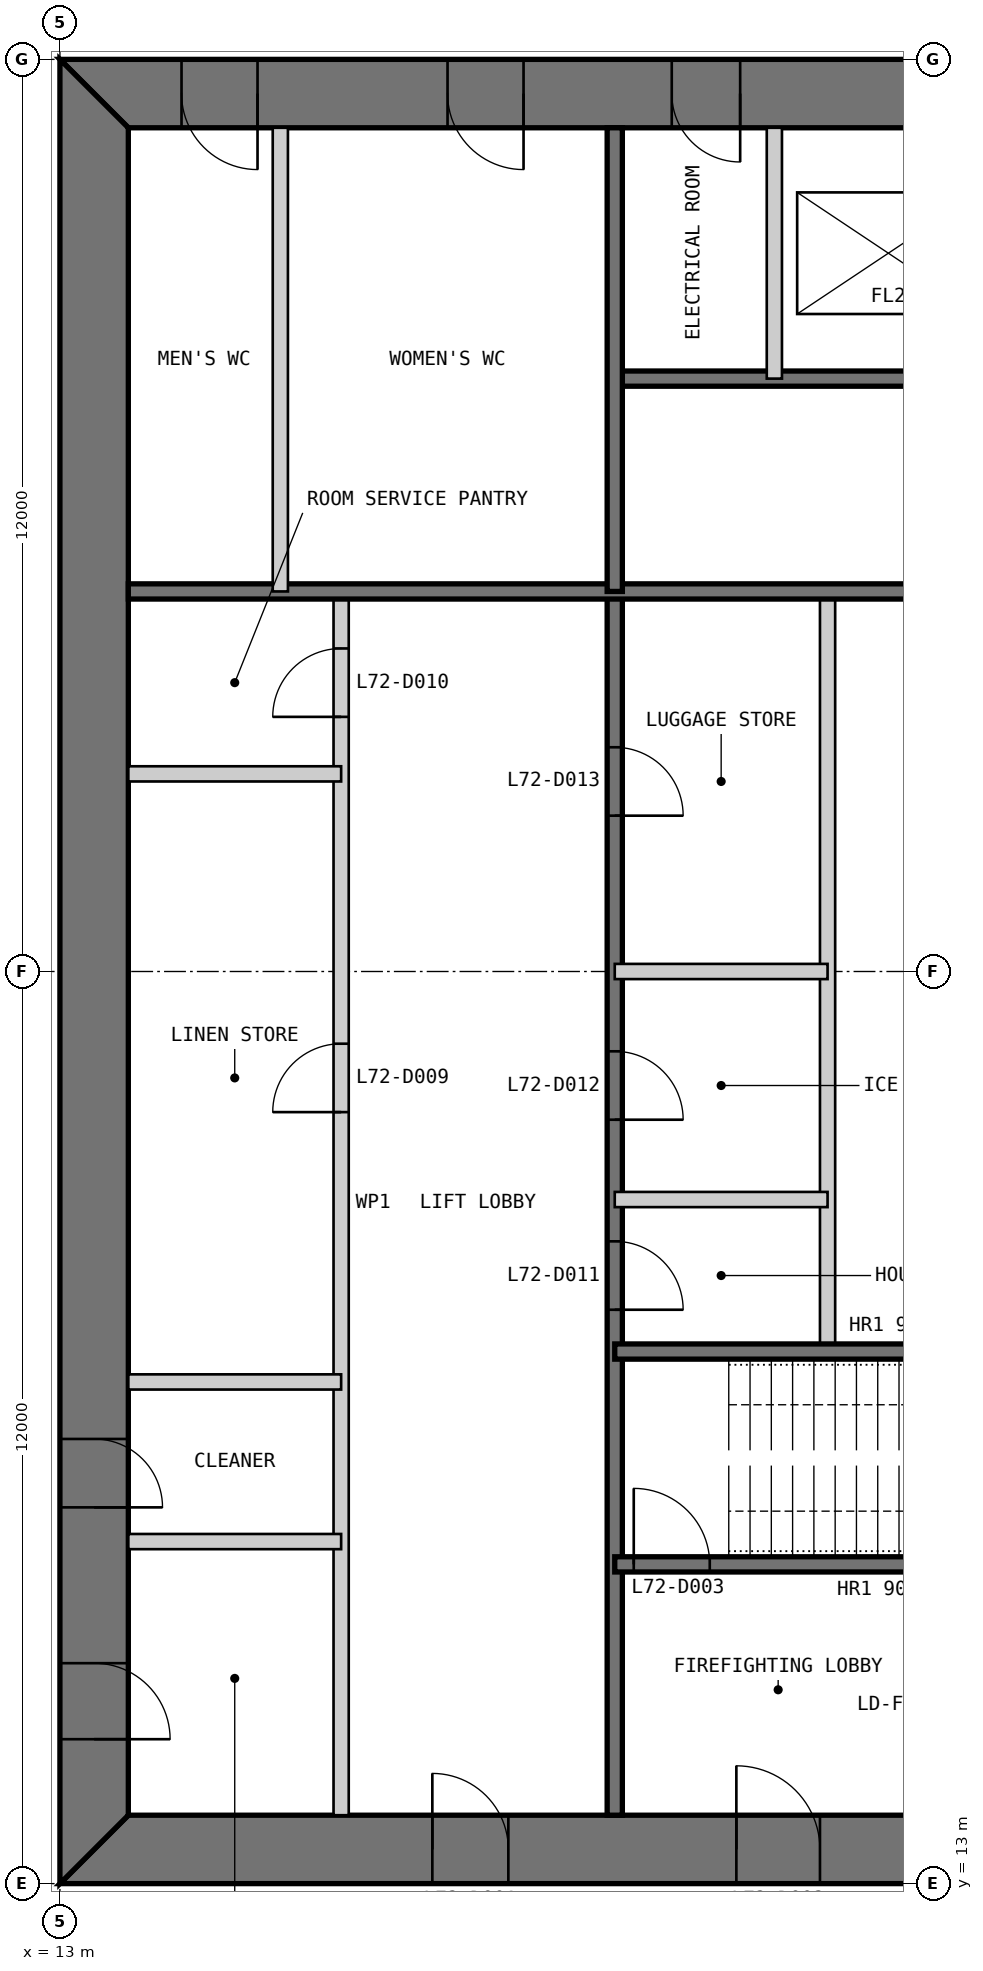
"""IFC4 building model, lengths in metres.
Left out: names, types, materials, properties, quantities, classifications, styles, units other than length and angle.
Written with IfcOpenShell. Run it as: python <this file> out.ifc"""

import sys

from ifc_helpers import new_model, si_unit, direction, frame, frame_2d, origin, place, context, subcontext, project, spatial, polyline, rectangle, outline, extrude, element, fill, save


model = new_model("IFC4")
c1 = context("Model", 3, precision=1e-05, world=origin(), true_north=direction((0.0, 1.0)))
c2 = subcontext(c1, "Body", "Model", "MODEL_VIEW")
j1 = project(units=[si_unit("LENGTHUNIT", "METRE"), si_unit("PLANEANGLEUNIT", "RADIAN")], contexts=[c1])
p1 = place(None, origin())
s1 = spatial("IfcSite", under=j1, at=p1, CompositionType="ELEMENT")
p2 = place(p1, origin())
s2 = spatial("IfcBuilding", under=s1, at=p2, CompositionType="ELEMENT")
p3 = place(p2, frame((0.0, 0.0, 296.8)))
s3 = spatial("IfcBuildingStorey", under=s2, at=p3, CompositionType="ELEMENT", Elevation=296.8)
p4 = place(p3, frame((13.0, 13.45, 0.0), z_axis=(0.0, 0.0, 1.0), x_axis=(1.0, 0.0, 0.0)))
e1 = element("IfcWall", 1, at=p4, inside=s3, PredefinedType="SHEAR", context=c2, shape_type="SweptSolid", body=[
    extrude(outline(polyline([(0.0, -0.45), (24.0, -0.45), (23.1, 0.45), (0.9, 0.45), (0.0, -0.45)])), origin(), (0.0, 0.0, 1.0), 5.0),
])
p5 = place(p4, frame((4.9, 0.0, 0.0)))
e2 = element("IfcOpeningElement", 2, at=p5, cuts=e1, PredefinedType="OPENING", context=c2, shape_type="SweptSolid", body=[
    extrude(rectangle(XDim=1.0, YDim=2.2, at=frame_2d((0.5, 1.1))), frame((0.0, 0.46, 0.0), z_axis=(0.0, -1.0, 0.0), x_axis=(1.0, 0.0, 0.0)), (0.0, 0.0, 1.0), 0.92),
])
p6 = place(p4, frame((8.9, 0.0, 0.0)))
e3 = element("IfcOpeningElement", 3, at=p6, cuts=e1, PredefinedType="OPENING", context=c2, shape_type="SweptSolid", body=[
    extrude(rectangle(XDim=1.1, YDim=2.2, at=frame_2d((0.55, 1.1))), frame((0.0, 0.46, 0.0), z_axis=(0.0, -1.0, 0.0), x_axis=(1.0, 0.0, 0.0)), (0.0, 0.0, 1.0), 0.92),
])
p7 = place(p4, frame((15.05, 0.0, 0.0)))
e4 = element("IfcOpeningElement", 4, at=p7, cuts=e1, PredefinedType="OPENING", context=c2, shape_type="SweptSolid", body=[
    extrude(rectangle(XDim=0.9, YDim=2.2, at=frame_2d((0.45, 1.1))), frame((0.0, 0.46, 0.0), z_axis=(0.0, -1.0, 0.0), x_axis=(1.0, 0.0, 0.0)), (0.0, 0.0, 1.0), 0.92),
])
p8 = place(p4, frame((17.9, 0.0, 0.0)))
e5 = element("IfcOpeningElement", 5, at=p8, cuts=e1, PredefinedType="OPENING", context=c2, shape_type="SweptSolid", body=[
    extrude(rectangle(XDim=1.0, YDim=2.2, at=frame_2d((0.5, 1.1))), frame((0.0, 0.46, 0.0), z_axis=(0.0, -1.0, 0.0), x_axis=(1.0, 0.0, 0.0)), (0.0, 0.0, 1.0), 0.92),
])
p9 = place(p4, frame((21.4, 0.0, 0.0)))
e6 = element("IfcOpeningElement", 6, at=p9, cuts=e1, PredefinedType="OPENING", context=c2, shape_type="SweptSolid", body=[
    extrude(rectangle(XDim=1.0, YDim=2.2, at=frame_2d((0.5, 1.1))), frame((0.0, 0.46, 0.0), z_axis=(0.0, -1.0, 0.0), x_axis=(1.0, 0.0, 0.0)), (0.0, 0.0, 1.0), 0.92),
])
p10 = place(p3, frame((37.0, 36.55, 0.0), z_axis=(0.0, 0.0, 1.0), x_axis=(-1.0, 0.0, 0.0)))
e7 = element("IfcWall", 7, at=p10, inside=s3, PredefinedType="SHEAR", context=c2, shape_type="SweptSolid", body=[
    extrude(outline(polyline([(0.0, -0.45), (24.0, -0.45), (23.1, 0.45), (0.9, 0.45), (0.0, -0.45)])), origin(), (0.0, 0.0, 1.0), 5.0),
])
p11 = place(p10, frame((4.9, 0.0, 0.0)))
e8 = element("IfcOpeningElement", 8, at=p11, cuts=e7, PredefinedType="OPENING", context=c2, shape_type="SweptSolid", body=[
    extrude(rectangle(XDim=1.0, YDim=2.2, at=frame_2d((0.5, 1.1))), frame((0.0, 0.46, 0.0), z_axis=(0.0, -1.0, 0.0), x_axis=(1.0, 0.0, 0.0)), (0.0, 0.0, 1.0), 0.92),
])
p12 = place(p10, frame((8.9, 0.0, 0.0)))
e9 = element("IfcOpeningElement", 9, at=p12, cuts=e7, PredefinedType="OPENING", context=c2, shape_type="SweptSolid", body=[
    extrude(rectangle(XDim=1.1, YDim=2.2, at=frame_2d((0.55, 1.1))), frame((0.0, 0.46, 0.0), z_axis=(0.0, -1.0, 0.0), x_axis=(1.0, 0.0, 0.0)), (0.0, 0.0, 1.0), 0.92),
])
p13 = place(p10, frame((15.05, 0.0, 0.0)))
e10 = element("IfcOpeningElement", 10, at=p13, cuts=e7, PredefinedType="OPENING", context=c2, shape_type="SweptSolid", body=[
    extrude(rectangle(XDim=0.9, YDim=2.2, at=frame_2d((0.45, 1.1))), frame((0.0, 0.46, 0.0), z_axis=(0.0, -1.0, 0.0), x_axis=(1.0, 0.0, 0.0)), (0.0, 0.0, 1.0), 0.92),
])
p14 = place(p10, frame((17.9, 0.0, 0.0)))
e11 = element("IfcOpeningElement", 11, at=p14, cuts=e7, PredefinedType="OPENING", context=c2, shape_type="SweptSolid", body=[
    extrude(rectangle(XDim=1.0, YDim=2.2, at=frame_2d((0.5, 1.1))), frame((0.0, 0.46, 0.0), z_axis=(0.0, -1.0, 0.0), x_axis=(1.0, 0.0, 0.0)), (0.0, 0.0, 1.0), 0.92),
])
p15 = place(p10, frame((21.4, 0.0, 0.0)))
e12 = element("IfcOpeningElement", 12, at=p15, cuts=e7, PredefinedType="OPENING", context=c2, shape_type="SweptSolid", body=[
    extrude(rectangle(XDim=1.0, YDim=2.2, at=frame_2d((0.5, 1.1))), frame((0.0, 0.46, 0.0), z_axis=(0.0, -1.0, 0.0), x_axis=(1.0, 0.0, 0.0)), (0.0, 0.0, 1.0), 0.92),
])
p16 = place(p3, frame((13.45, 36.1, 0.0), z_axis=(0.0, 0.0, 1.0), x_axis=(0.0, -1.0, 0.0)))
e13 = element("IfcWall", 13, at=p16, inside=s3, PredefinedType="SHEAR", context=c2, shape_type="SweptSolid", body=[
    extrude(outline(polyline([(-0.9, -0.45), (23.1, -0.45), (22.2, 0.45), (0.0, 0.45), (-0.9, -0.45)])), origin(), (0.0, 0.0, 1.0), 5.0),
])
p17 = place(p16, frame((20.2, 0.0, 0.0)))
e14 = element("IfcOpeningElement", 14, at=p17, cuts=e13, PredefinedType="OPENING", context=c2, shape_type="SweptSolid", body=[
    extrude(rectangle(XDim=1.0, YDim=2.2, at=frame_2d((0.5, 1.1))), frame((0.0, 0.46, 0.0), z_axis=(0.0, -1.0, 0.0), x_axis=(1.0, 0.0, 0.0)), (0.0, 0.0, 1.0), 0.92),
])
p18 = place(p16, frame((17.25, 0.0, 0.0)))
e15 = element("IfcOpeningElement", 15, at=p18, cuts=e13, PredefinedType="OPENING", context=c2, shape_type="SweptSolid", body=[
    extrude(rectangle(XDim=0.9, YDim=2.2, at=frame_2d((0.45, 1.1))), frame((0.0, 0.46, 0.0), z_axis=(0.0, -1.0, 0.0), x_axis=(1.0, 0.0, 0.0)), (0.0, 0.0, 1.0), 0.92),
])
p19 = place(p3, frame((16.7, 13.9, 0.0), z_axis=(0.0, 0.0, 1.0), x_axis=(0.0, 1.0, 0.0)))
e16 = element("IfcWall", 16, at=p19, inside=s3, PredefinedType="PARTITIONING", context=c2, shape_type="SweptSolid", body=[
    extrude(rectangle(XDim=16.1, YDim=0.2, at=frame_2d((8.05, 0.0))), origin(), (0.0, 0.0, 1.0), 4.8),
])
p20 = place(p19, frame((9.25, 0.0, 0.0)))
e17 = element("IfcOpeningElement", 17, at=p20, cuts=e16, PredefinedType="OPENING", context=c2, shape_type="SweptSolid", body=[
    extrude(rectangle(XDim=0.9, YDim=2.2, at=frame_2d((0.45, 1.1))), frame((0.0, 0.11, 0.0), z_axis=(0.0, -1.0, 0.0), x_axis=(1.0, 0.0, 0.0)), (0.0, 0.0, 1.0), 0.22),
])
p21 = place(p19, frame((14.45, 0.0, 0.0)))
e18 = element("IfcOpeningElement", 18, at=p21, cuts=e16, PredefinedType="OPENING", context=c2, shape_type="SweptSolid", body=[
    extrude(rectangle(XDim=0.9, YDim=2.2, at=frame_2d((0.45, 1.1))), frame((0.0, 0.11, 0.0), z_axis=(0.0, -1.0, 0.0), x_axis=(1.0, 0.0, 0.0)), (0.0, 0.0, 1.0), 0.22),
])
p22 = place(p3, frame((20.3, 13.9, 0.0), z_axis=(0.0, 0.0, 1.0), x_axis=(0.0, 1.0, 0.0)))
e19 = element("IfcWall", 19, at=p22, inside=s3, PredefinedType="SOLIDWALL", context=c2, shape_type="SweptSolid", body=[
    extrude(rectangle(XDim=16.1, YDim=0.2, at=frame_2d((8.05, 0.0))), origin(), (0.0, 0.0, 1.0), 4.8),
])
p23 = place(p22, frame((6.65, 0.0, 0.0)))
e20 = element("IfcOpeningElement", 20, at=p23, cuts=e19, PredefinedType="OPENING", context=c2, shape_type="SweptSolid", body=[
    extrude(rectangle(XDim=0.9, YDim=2.2, at=frame_2d((0.45, 1.1))), frame((0.0, 0.11, 0.0), z_axis=(0.0, -1.0, 0.0), x_axis=(1.0, 0.0, 0.0)), (0.0, 0.0, 1.0), 0.22),
])
p24 = place(p22, frame((9.15, 0.0, 0.0)))
e21 = element("IfcOpeningElement", 21, at=p24, cuts=e19, PredefinedType="OPENING", context=c2, shape_type="SweptSolid", body=[
    extrude(rectangle(XDim=0.9, YDim=2.2, at=frame_2d((0.45, 1.1))), frame((0.0, 0.11, 0.0), z_axis=(0.0, -1.0, 0.0), x_axis=(1.0, 0.0, 0.0)), (0.0, 0.0, 1.0), 0.22),
])
p25 = place(p22, frame((13.15, 0.0, 0.0)))
e22 = element("IfcOpeningElement", 22, at=p25, cuts=e19, PredefinedType="OPENING", context=c2, shape_type="SweptSolid", body=[
    extrude(rectangle(XDim=0.9, YDim=2.2, at=frame_2d((0.45, 1.1))), frame((0.0, 0.11, 0.0), z_axis=(0.0, -1.0, 0.0), x_axis=(1.0, 0.0, 0.0)), (0.0, 0.0, 1.0), 0.22),
])
p26 = place(p3, frame((23.1, 20.0, 0.0), z_axis=(0.0, 0.0, 1.0), x_axis=(0.0, 1.0, 0.0)))
e23 = element("IfcWall", 23, at=p26, inside=s3, PredefinedType="PARTITIONING", context=c2, shape_type="SweptSolid", body=[
    extrude(rectangle(XDim=10.0, YDim=0.2, at=frame_2d((5.0, 0.0))), origin(), (0.0, 0.0, 1.0), 4.8),
])
p27 = place(p3, frame((20.3, 17.2, 0.0), z_axis=(0.0, 0.0, 1.0), x_axis=(1.0, 0.0, 0.0)))
e24 = element("IfcWall", 24, at=p27, inside=s3, PredefinedType="SOLIDWALL", context=c2, shape_type="SweptSolid", body=[
    extrude(rectangle(XDim=9.4, YDim=0.2, at=frame_2d((4.7, 0.0))), origin(), (0.0, 0.0, 1.0), 4.8),
])
p28 = place(p27, frame((0.25, 0.0, 0.0)))
e25 = element("IfcOpeningElement", 25, at=p28, cuts=e24, PredefinedType="OPENING", context=c2, shape_type="SweptSolid", body=[
    extrude(rectangle(XDim=1.0, YDim=2.2, at=frame_2d((0.5, 1.1))), frame((0.0, 0.11, 0.0), z_axis=(0.0, -1.0, 0.0), x_axis=(1.0, 0.0, 0.0)), (0.0, 0.0, 1.0), 0.22),
])
p29 = place(p3, frame((20.3, 20.0, 0.0), z_axis=(0.0, 0.0, 1.0), x_axis=(1.0, 0.0, 0.0)))
e26 = element("IfcWall", 26, at=p29, inside=s3, PredefinedType="SOLIDWALL", context=c2, shape_type="SweptSolid", body=[
    extrude(rectangle(XDim=15.8, YDim=0.2, at=frame_2d((7.9, 0.0))), origin(), (0.0, 0.0, 1.0), 4.8),
])
for number, where, z_axis, x_axis in (
    (27, (13.9, 17.5, 0.0), (0.0, 0.0, 1.0), (1.0, 0.0, 0.0)),
    (28, (13.9, 19.6, 0.0), (0.0, 0.0, 1.0), (1.0, 0.0, 0.0)),
    (29, (13.9, 27.6, 0.0), (0.0, 0.0, 1.0), (1.0, 0.0, 0.0)),
    (30, (20.3, 22.0, 0.0), (0.0, 0.0, 1.0), (1.0, 0.0, 0.0)),
    (31, (20.3, 25.0, 0.0), (0.0, 0.0, 1.0), (1.0, 0.0, 0.0)),
):
    element("IfcWall", number, at=place(p3, frame(where, z_axis=z_axis, x_axis=x_axis)), inside=s3, PredefinedType="PARTITIONING", context=c2, shape_type="SweptSolid", body=[
        extrude(rectangle(XDim=2.8, YDim=0.2, at=frame_2d((1.4, 0.0))), origin(), (0.0, 0.0, 1.0), 4.8),
    ])
p30 = place(p3, frame((29.7, 32.8, 0.0), z_axis=(0.0, 0.0, 1.0), x_axis=(-1.0, 0.0, 0.0)))
e32 = element("IfcWall", 32, at=p30, inside=s3, PredefinedType="SOLIDWALL", context=c2, shape_type="SweptSolid", body=[
    extrude(rectangle(XDim=9.4, YDim=0.2, at=frame_2d((4.7, 0.0))), origin(), (0.0, 0.0, 1.0), 4.8),
])
p31 = place(p30, frame((0.25, 0.0, 0.0)))
e33 = element("IfcOpeningElement", 33, at=p31, cuts=e32, PredefinedType="OPENING", context=c2, shape_type="SweptSolid", body=[
    extrude(rectangle(XDim=1.0, YDim=2.2, at=frame_2d((0.5, 1.1))), frame((0.0, 0.11, 0.0), z_axis=(0.0, -1.0, 0.0), x_axis=(1.0, 0.0, 0.0)), (0.0, 0.0, 1.0), 0.22),
])
p32 = place(p3, frame((29.7, 30.0, 0.0), z_axis=(0.0, 0.0, 1.0), x_axis=(-1.0, 0.0, 0.0)))
e34 = element("IfcWall", 34, at=p32, inside=s3, PredefinedType="SOLIDWALL", context=c2, shape_type="SweptSolid", body=[
    extrude(rectangle(XDim=15.8, YDim=0.2, at=frame_2d((7.9, 0.0))), origin(), (0.0, 0.0, 1.0), 4.8),
])
p33 = place(p3, frame((22.4, 36.1, 0.0), z_axis=(0.0, 0.0, 1.0), x_axis=(0.0, -1.0, 0.0)))
e35 = element("IfcWall", 35, at=p33, inside=s3, PredefinedType="PARTITIONING", context=c2, shape_type="SweptSolid", body=[
    extrude(rectangle(XDim=3.3, YDim=0.2, at=frame_2d((1.65, 0.0))), origin(), (0.0, 0.0, 1.0), 4.8),
])
p34 = place(p3, frame((20.3, 36.1, 0.0), z_axis=(0.0, 0.0, 1.0), x_axis=(0.0, -1.0, 0.0)))
e36 = element("IfcWall", 36, at=p34, inside=s3, PredefinedType="SOLIDWALL", context=c2, shape_type="SweptSolid", body=[
    extrude(rectangle(XDim=6.1, YDim=0.2, at=frame_2d((3.05, 0.0))), origin(), (0.0, 0.0, 1.0), 4.8),
])
p35 = place(p3, frame((15.9, 36.1, 0.0), z_axis=(0.0, 0.0, 1.0), x_axis=(0.0, -1.0, 0.0)))
e37 = element("IfcWall", 37, at=p35, inside=s3, PredefinedType="PARTITIONING", context=c2, shape_type="SweptSolid", body=[
    extrude(rectangle(XDim=6.1, YDim=0.2, at=frame_2d((3.05, 0.0))), origin(), (0.0, 0.0, 1.0), 4.8),
])
p36 = place(p5, origin())
e38 = element("IfcDoor", 38, at=p36, inside=s3, OperationType="SINGLE_SWING_LEFT", PredefinedType="DOOR", context=c2, shape_type="SweptSolid", body=[
    extrude(rectangle(XDim=1.0, YDim=2.2, at=frame_2d((0.5, 1.1))), frame((0.0, 0.025, 0.0), z_axis=(0.0, -1.0, 0.0), x_axis=(1.0, 0.0, 0.0)), (0.0, 0.0, 1.0), 0.05),
    extrude(outline(polyline([(0.0, 0.0), (0.04, 0.0), (0.04, 2.16), (0.96, 2.16), (0.96, 0.0), (1.0, 0.0), (1.0, 2.2), (0.0, 2.2), (0.0, 0.0)])), frame((0.0, 0.3, 0.0), z_axis=(0.0, -1.0, 0.0), x_axis=(1.0, 0.0, 0.0)), (0.0, 0.0, 1.0), 0.6),
])
fill(e2, e38)
p37 = place(p6, origin())
e39 = element("IfcDoor", 39, at=p37, inside=s3, OperationType="SINGLE_SWING_LEFT", PredefinedType="DOOR", context=c2, shape_type="SweptSolid", body=[
    extrude(rectangle(XDim=1.1, YDim=2.2, at=frame_2d((0.55, 1.1))), frame((0.0, 0.025, 0.0), z_axis=(0.0, -1.0, 0.0), x_axis=(1.0, 0.0, 0.0)), (0.0, 0.0, 1.0), 0.05),
    extrude(outline(polyline([(0.0, 0.0), (0.04, 0.0), (0.04, 2.16), (1.06, 2.16), (1.06, 0.0), (1.1, 0.0), (1.1, 2.2), (0.0, 2.2), (0.0, 0.0)])), frame((0.0, 0.3, 0.0), z_axis=(0.0, -1.0, 0.0), x_axis=(1.0, 0.0, 0.0)), (0.0, 0.0, 1.0), 0.6),
])
fill(e3, e39)
p38 = place(p28, origin())
e40 = element("IfcDoor", 40, at=p38, inside=s3, OperationType="SINGLE_SWING_LEFT", PredefinedType="DOOR", context=c2, shape_type="SweptSolid", body=[
    extrude(rectangle(XDim=1.0, YDim=2.2, at=frame_2d((0.5, 1.1))), frame((0.0, 0.025, 0.0), z_axis=(0.0, -1.0, 0.0), x_axis=(1.0, 0.0, 0.0)), (0.0, 0.0, 1.0), 0.05),
])
fill(e25, e40)
p39 = place(p17, origin())
e41 = element("IfcDoor", 41, at=p39, inside=s3, OperationType="SINGLE_SWING_RIGHT", PredefinedType="DOOR", context=c2, shape_type="SweptSolid", body=[
    extrude(rectangle(XDim=1.0, YDim=2.2, at=frame_2d((0.5, 1.1))), frame((0.0, 0.025, 0.0), z_axis=(0.0, -1.0, 0.0), x_axis=(1.0, 0.0, 0.0)), (0.0, 0.0, 1.0), 0.05),
    extrude(outline(polyline([(0.0, 0.0), (0.04, 0.0), (0.04, 2.16), (0.96, 2.16), (0.96, 0.0), (1.0, 0.0), (1.0, 2.2), (0.0, 2.2), (0.0, 0.0)])), frame((0.0, 0.3, 0.0), z_axis=(0.0, -1.0, 0.0), x_axis=(1.0, 0.0, 0.0)), (0.0, 0.0, 1.0), 0.6),
])
fill(e14, e41)
p40 = place(p18, origin())
e42 = element("IfcDoor", 42, at=p40, inside=s3, OperationType="SINGLE_SWING_RIGHT", PredefinedType="DOOR", context=c2, shape_type="SweptSolid", body=[
    extrude(rectangle(XDim=0.9, YDim=2.2, at=frame_2d((0.45, 1.1))), frame((0.0, 0.025, 0.0), z_axis=(0.0, -1.0, 0.0), x_axis=(1.0, 0.0, 0.0)), (0.0, 0.0, 1.0), 0.05),
    extrude(outline(polyline([(0.0, 0.0), (0.04, 0.0), (0.04, 2.16), (0.86, 2.16), (0.86, 0.0), (0.9, 0.0), (0.9, 2.2), (0.0, 2.2), (0.0, 0.0)])), frame((0.0, 0.3, 0.0), z_axis=(0.0, -1.0, 0.0), x_axis=(1.0, 0.0, 0.0)), (0.0, 0.0, 1.0), 0.6),
])
fill(e15, e42)
p41 = place(p20, origin())
e43 = element("IfcDoor", 43, at=p41, inside=s3, OperationType="SINGLE_SWING_LEFT", PredefinedType="DOOR", context=c2, shape_type="SweptSolid", body=[
    extrude(rectangle(XDim=0.9, YDim=2.2, at=frame_2d((0.45, 1.1))), frame((0.0, 0.025, 0.0), z_axis=(0.0, -1.0, 0.0), x_axis=(1.0, 0.0, 0.0)), (0.0, 0.0, 1.0), 0.05),
])
fill(e17, e43)
p42 = place(p21, origin())
e44 = element("IfcDoor", 44, at=p42, inside=s3, OperationType="SINGLE_SWING_LEFT", PredefinedType="DOOR", context=c2, shape_type="SweptSolid", body=[
    extrude(rectangle(XDim=0.9, YDim=2.2, at=frame_2d((0.45, 1.1))), frame((0.0, 0.025, 0.0), z_axis=(0.0, -1.0, 0.0), x_axis=(1.0, 0.0, 0.0)), (0.0, 0.0, 1.0), 0.05),
])
fill(e18, e44)
p43 = place(p23, frame((0.9, 0.0, 0.0), z_axis=(0.0, 0.0, 1.0), x_axis=(-1.0, 0.0, 0.0)))
e45 = element("IfcDoor", 45, at=p43, inside=s3, OperationType="SINGLE_SWING_RIGHT", PredefinedType="DOOR", context=c2, shape_type="SweptSolid", body=[
    extrude(rectangle(XDim=0.9, YDim=2.2, at=frame_2d((0.45, 1.1))), frame((0.0, 0.025, 0.0), z_axis=(0.0, -1.0, 0.0), x_axis=(1.0, 0.0, 0.0)), (0.0, 0.0, 1.0), 0.05),
])
fill(e20, e45)
p44 = place(p24, frame((0.9, 0.0, 0.0), z_axis=(0.0, 0.0, 1.0), x_axis=(-1.0, 0.0, 0.0)))
e46 = element("IfcDoor", 46, at=p44, inside=s3, OperationType="SINGLE_SWING_RIGHT", PredefinedType="DOOR", context=c2, shape_type="SweptSolid", body=[
    extrude(rectangle(XDim=0.9, YDim=2.2, at=frame_2d((0.45, 1.1))), frame((0.0, 0.025, 0.0), z_axis=(0.0, -1.0, 0.0), x_axis=(1.0, 0.0, 0.0)), (0.0, 0.0, 1.0), 0.05),
])
fill(e21, e46)
p45 = place(p25, frame((0.9, 0.0, 0.0), z_axis=(0.0, 0.0, 1.0), x_axis=(-1.0, 0.0, 0.0)))
e47 = element("IfcDoor", 47, at=p45, inside=s3, OperationType="SINGLE_SWING_RIGHT", PredefinedType="DOOR", context=c2, shape_type="SweptSolid", body=[
    extrude(rectangle(XDim=0.9, YDim=2.2, at=frame_2d((0.45, 1.1))), frame((0.0, 0.025, 0.0), z_axis=(0.0, -1.0, 0.0), x_axis=(1.0, 0.0, 0.0)), (0.0, 0.0, 1.0), 0.05),
])
fill(e22, e47)
p46 = place(p13, origin())
e48 = element("IfcDoor", 48, at=p46, inside=s3, OperationType="SINGLE_SWING_LEFT", PredefinedType="DOOR", context=c2, shape_type="SweptSolid", body=[
    extrude(rectangle(XDim=0.9, YDim=2.2, at=frame_2d((0.45, 1.1))), frame((0.0, 0.025, 0.0), z_axis=(0.0, -1.0, 0.0), x_axis=(1.0, 0.0, 0.0)), (0.0, 0.0, 1.0), 0.05),
    extrude(outline(polyline([(0.0, 0.0), (0.04, 0.0), (0.04, 2.16), (0.86, 2.16), (0.86, 0.0), (0.9, 0.0), (0.9, 2.2), (0.0, 2.2), (0.0, 0.0)])), frame((0.0, 0.3, 0.0), z_axis=(0.0, -1.0, 0.0), x_axis=(1.0, 0.0, 0.0)), (0.0, 0.0, 1.0), 0.6),
])
fill(e10, e48)
p47 = place(p14, origin())
e49 = element("IfcDoor", 49, at=p47, inside=s3, OperationType="SINGLE_SWING_LEFT", PredefinedType="DOOR", context=c2, shape_type="SweptSolid", body=[
    extrude(rectangle(XDim=1.0, YDim=2.2, at=frame_2d((0.5, 1.1))), frame((0.0, 0.025, 0.0), z_axis=(0.0, -1.0, 0.0), x_axis=(1.0, 0.0, 0.0)), (0.0, 0.0, 1.0), 0.05),
    extrude(outline(polyline([(0.0, 0.0), (0.04, 0.0), (0.04, 2.16), (0.96, 2.16), (0.96, 0.0), (1.0, 0.0), (1.0, 2.2), (0.0, 2.2), (0.0, 0.0)])), frame((0.0, 0.3, 0.0), z_axis=(0.0, -1.0, 0.0), x_axis=(1.0, 0.0, 0.0)), (0.0, 0.0, 1.0), 0.6),
])
fill(e11, e49)
p48 = place(p15, origin())
e50 = element("IfcDoor", 50, at=p48, inside=s3, OperationType="SINGLE_SWING_LEFT", PredefinedType="DOOR", context=c2, shape_type="SweptSolid", body=[
    extrude(rectangle(XDim=1.0, YDim=2.2, at=frame_2d((0.5, 1.1))), frame((0.0, 0.025, 0.0), z_axis=(0.0, -1.0, 0.0), x_axis=(1.0, 0.0, 0.0)), (0.0, 0.0, 1.0), 0.05),
    extrude(outline(polyline([(0.0, 0.0), (0.04, 0.0), (0.04, 2.16), (0.96, 2.16), (0.96, 0.0), (1.0, 0.0), (1.0, 2.2), (0.0, 2.2), (0.0, 0.0)])), frame((0.0, 0.3, 0.0), z_axis=(0.0, -1.0, 0.0), x_axis=(1.0, 0.0, 0.0)), (0.0, 0.0, 1.0), 0.6),
])
fill(e12, e50)
save(model, sys.argv[1])
